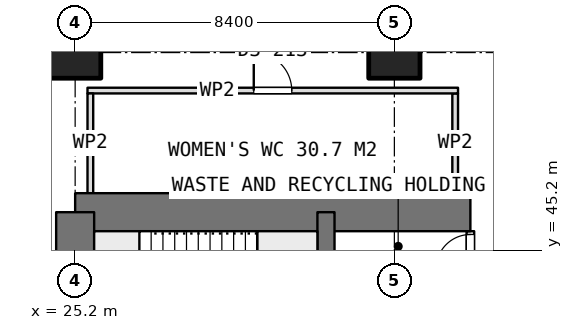
"""IFC4 building model, lengths in metres.
Left out: names, types, materials, properties, quantities, classifications, styles, units other than length and angle.
Written with IfcOpenShell. Run it as: python <this file> out.ifc"""

import sys

from ifc_helpers import new_model, si_unit, direction, frame, frame_2d, origin, origin_2d, place, context, subcontext, project, spatial, rectangle, extrude, element, fill, save


model = new_model("IFC4")
c1 = context("Model", 3, precision=1e-05, world=origin(), true_north=direction((0.0, 1.0)))
c2 = subcontext(c1, "Body", "Model", "MODEL_VIEW")
j1 = project(units=[si_unit("LENGTHUNIT", "METRE"), si_unit("PLANEANGLEUNIT", "RADIAN")], contexts=[c1])
p1 = place(None, origin())
s1 = spatial("IfcSite", under=j1, at=p1, CompositionType="ELEMENT")
p2 = place(p1, origin())
s2 = spatial("IfcBuilding", under=s1, at=p2, CompositionType="ELEMENT")
p3 = place(p2, frame((0.0, 0.0, 198.95)))
s3 = spatial("IfcBuildingStorey", under=s2, at=p3, CompositionType="ELEMENT", Elevation=198.95)
p4 = place(p3, frame((25.2, 46.2, 0.0), z_axis=(0.0, 0.0, 1.0), x_axis=(1.0, 0.0, 0.0)))
e1 = element("IfcWall", 1, at=p4, inside=s3, PredefinedType="SHEAR", context=c2, shape_type="SweptSolid", body=[
    extrude(rectangle(XDim=10.4, YDim=1.0, at=frame_2d((5.2, 0.0))), origin(), (0.0, 0.0, 1.0), 3.75),
])
p5 = place(p3, frame((25.2, 21.0, 0.0), z_axis=(0.0, 0.0, 1.0), x_axis=(0.0, 1.0, 0.0)))
e2 = element("IfcWall", 2, at=p5, inside=s3, PredefinedType="SHEAR", context=c2, shape_type="SweptSolid", body=[
    extrude(rectangle(XDim=25.2, YDim=1.0, at=frame_2d((12.6, 0.0))), origin(), (0.0, 0.0, 1.0), 3.75),
])
p6 = place(p5, frame((7.8, 0.0, 0.0)))
e3 = element("IfcOpeningElement", 3, at=p6, cuts=e2, PredefinedType="OPENING", context=c2, shape_type="SweptSolid", body=[
    extrude(rectangle(XDim=1.2, YDim=2.1, at=frame_2d((0.6, 1.05))), frame((0.0, 0.51, 0.0), z_axis=(0.0, -1.0, 0.0), x_axis=(1.0, 0.0, 0.0)), (0.0, 0.0, 1.0), 1.02),
])
p7 = place(p5, frame((14.25, 0.0, 0.0)))
e4 = element("IfcOpeningElement", 4, at=p7, cuts=e2, PredefinedType="OPENING", context=c2, shape_type="SweptSolid", body=[
    extrude(rectangle(XDim=0.9, YDim=2.1, at=frame_2d((0.45, 1.05))), frame((0.0, 0.51, 0.0), z_axis=(0.0, -1.0, 0.0), x_axis=(1.0, 0.0, 0.0)), (0.0, 0.0, 1.0), 1.02),
])
p8 = place(p5, frame((16.85, 0.0, 0.0)))
e5 = element("IfcOpeningElement", 5, at=p8, cuts=e2, PredefinedType="OPENING", context=c2, shape_type="SweptSolid", body=[
    extrude(rectangle(XDim=0.9, YDim=2.1, at=frame_2d((0.45, 1.05))), frame((0.0, 0.51, 0.0), z_axis=(0.0, -1.0, 0.0), x_axis=(1.0, 0.0, 0.0)), (0.0, 0.0, 1.0), 1.02),
])
p9 = place(p5, frame((19.025, 0.0, 0.0)))
e6 = element("IfcOpeningElement", 6, at=p9, cuts=e2, PredefinedType="OPENING", context=c2, shape_type="SweptSolid", body=[
    extrude(rectangle(XDim=1.2, YDim=2.1, at=frame_2d((0.6, 1.05))), frame((0.0, 0.51, 0.0), z_axis=(0.0, -1.0, 0.0), x_axis=(1.0, 0.0, 0.0)), (0.0, 0.0, 1.0), 1.02),
])
p10 = place(p3, frame((31.8, 21.0, 0.0), z_axis=(0.0, 0.0, 1.0), x_axis=(0.0, 1.0, 0.0)))
e7 = element("IfcWall", 7, at=p10, inside=s3, PredefinedType="SHEAR", context=c2, shape_type="SweptSolid", body=[
    extrude(rectangle(XDim=25.2, YDim=0.45, at=frame_2d((12.6, 0.0))), origin(), (0.0, 0.0, 1.0), 3.75),
])
for number, where, z_axis, x_axis in (
    (8, (25.2, 50.4, 0.0), (0.0, 0.0, 1.0), (1.0, 0.0, 0.0)),
    (9, (33.6, 50.4, 0.0), (0.0, 0.0, 1.0), (1.0, 0.0, 0.0)),
):
    element("IfcColumn", number, at=place(p3, frame(where, z_axis=z_axis, x_axis=x_axis)), inside=s3, PredefinedType="COLUMN", context=c2, shape_type="SweptSolid", body=[
        extrude(rectangle(XDim=1.35, YDim=1.35, at=origin_2d()), origin(), (0.0, 0.0, 1.0), 3.75),
    ])
p11 = place(p3, frame((35.6, 41.625, 0.0), z_axis=(0.0, 0.0, 1.0), x_axis=(0.0, 1.0, 0.0)))
e10 = element("IfcWall", 10, at=p11, inside=s3, PredefinedType="PARTITIONING", context=c2, shape_type="SweptSolid", body=[
    extrude(rectangle(XDim=4.075, YDim=0.2, at=frame_2d((2.038, 0.0))), origin(), (0.0, 0.0, 1.0), 3.5),
])
p12 = place(p11, frame((3.088, 0.0, 0.0)))
e11 = element("IfcOpeningElement", 11, at=p12, cuts=e10, PredefinedType="OPENING", context=c2, shape_type="SweptSolid", body=[
    extrude(rectangle(XDim=0.9, YDim=2.1, at=frame_2d((0.45, 1.05))), frame((0.0, 0.11, 0.0), z_axis=(0.0, -1.0, 0.0), x_axis=(1.0, 0.0, 0.0)), (0.0, 0.0, 1.0), 0.22),
])
p13 = place(p11, frame((0.725, 0.0, 0.0)))
e12 = element("IfcOpeningElement", 12, at=p13, cuts=e10, PredefinedType="OPENING", context=c2, shape_type="SweptSolid", body=[
    extrude(rectangle(XDim=1.1, YDim=2.1, at=frame_2d((0.55, 1.05))), frame((0.0, 0.11, 0.0), z_axis=(0.0, -1.0, 0.0), x_axis=(1.0, 0.0, 0.0)), (0.0, 0.0, 1.0), 0.22),
])
p14 = place(p3, frame((25.525, 49.4, 0.0), z_axis=(0.0, 0.0, 1.0), x_axis=(1.0, 0.0, 0.0)))
e13 = element("IfcWall", 13, at=p14, inside=s3, PredefinedType="PARTITIONING", context=c2, shape_type="SweptSolid", body=[
    extrude(rectangle(XDim=9.75, YDim=0.15, at=frame_2d((4.875, 0.0))), origin(), (0.0, 0.0, 1.0), 3.5),
])
p15 = place(p14, frame((4.375, 0.0, 0.0)))
e14 = element("IfcOpeningElement", 14, at=p15, cuts=e13, PredefinedType="OPENING", context=c2, shape_type="SweptSolid", body=[
    extrude(rectangle(XDim=1.0, YDim=2.1, at=frame_2d((0.5, 1.05))), frame((0.0, 0.085, 0.0), z_axis=(0.0, -1.0, 0.0), x_axis=(1.0, 0.0, 0.0)), (0.0, 0.0, 1.0), 0.17),
])
for number, where, z_axis, x_axis in (
    (15, (25.6, 46.7, 0.0), (0.0, 0.0, 1.0), (0.0, 1.0, 0.0)),
    (16, (35.2, 46.7, 0.0), (0.0, 0.0, 1.0), (0.0, 1.0, 0.0)),
):
    element("IfcWall", number, at=place(p3, frame(where, z_axis=z_axis, x_axis=x_axis)), inside=s3, PredefinedType="PARTITIONING", context=c2, shape_type="SweptSolid", body=[
        extrude(rectangle(XDim=2.625, YDim=0.15, at=frame_2d((1.312, 0.0))), origin(), (0.0, 0.0, 1.0), 3.5),
    ])
p16 = place(p12, origin())
e17 = element("IfcDoor", 17, at=p16, inside=s3, OperationType="SINGLE_SWING_LEFT", PredefinedType="DOOR", context=c2, shape_type="SweptSolid", body=[
    extrude(rectangle(XDim=0.9, YDim=2.1, at=frame_2d((0.45, 1.05))), frame((0.0, 0.025, 0.0), z_axis=(0.0, -1.0, 0.0), x_axis=(1.0, 0.0, 0.0)), (0.0, 0.0, 1.0), 0.05),
])
fill(e11, e17)
p17 = place(p15, origin())
e18 = element("IfcDoor", 18, at=p17, inside=s3, OperationType="SINGLE_SWING_LEFT", PredefinedType="DOOR", context=c2, shape_type="SweptSolid", body=[
    extrude(rectangle(XDim=1.0, YDim=2.1, at=frame_2d((0.5, 1.05))), frame((0.0, 0.025, 0.0), z_axis=(0.0, -1.0, 0.0), x_axis=(1.0, 0.0, 0.0)), (0.0, 0.0, 1.0), 0.05),
])
fill(e14, e18)
save(model, sys.argv[1])
